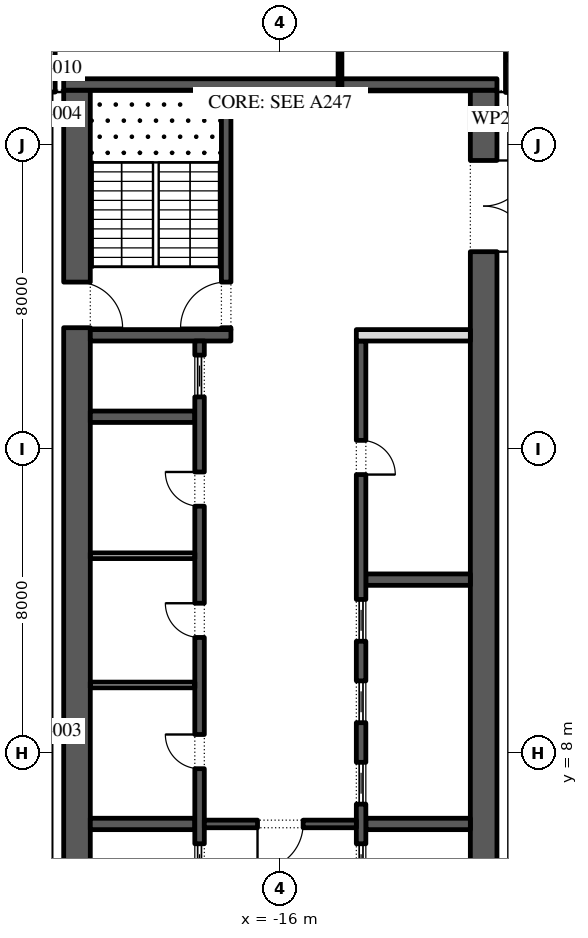
"""IFC4 building model, lengths in metres.
Left out: names, types, materials, properties, quantities, classifications, styles, units other than length and angle.
Written with IfcOpenShell. Run it as: python <this file> out.ifc"""

import sys

from ifc_helpers import new_model, si_unit, direction, frame, frame_2d, origin, place, context, subcontext, project, spatial, rectangle, extrude, element, fill, save


model = new_model("IFC4")
c1 = context("Model", 3, precision=1e-05, world=origin(), true_north=direction((0.0, 1.0)))
c2 = subcontext(c1, "Body", "Model", "MODEL_VIEW")
j1 = project(units=[si_unit("LENGTHUNIT", "METRE"), si_unit("PLANEANGLEUNIT", "RADIAN")], contexts=[c1])
p1 = place(None, origin())
s1 = spatial("IfcSite", under=j1, at=p1, CompositionType="ELEMENT")
p2 = place(p1, origin())
s2 = spatial("IfcBuilding", under=s1, at=p2, CompositionType="ELEMENT")
p3 = place(p2, frame((0.0, 0.0, 201.0)))
s3 = spatial("IfcBuildingStorey", under=s2, at=p3, CompositionType="ELEMENT", Elevation=201.0)
p4 = place(p3, frame((-33.157, 30.092, 0.0), z_axis=(0.0, 0.0, 1.0), x_axis=(0.224950279389, -0.974370243697, 0.0)))
e1 = element("IfcWall", 1, at=p4, inside=s3, PredefinedType="STANDARD", context=c2, shape_type="SweptSolid", body=[
    extrude(rectangle(XDim=49.5, YDim=0.3, at=frame_2d((24.75, 0.0))), origin(), (0.0, 0.0, 1.0), 4.0),
])
p5 = place(p4, frame((2.207, 0.0, 0.0)))
e2 = element("IfcOpeningElement", 2, at=p5, cuts=e1, PredefinedType="OPENING", context=c2, shape_type="SweptSolid", body=[
    extrude(rectangle(XDim=2.4, YDim=3.5, at=frame_2d((1.2, 1.75))), frame((0.0, 0.16, 0.0), z_axis=(0.0, -1.0, 0.0), x_axis=(1.0, 0.0, 0.0)), (0.0, 0.0, 1.0), 0.32),
])
p6 = place(p4, frame((8.121, 0.0, 0.45)))
e3 = element("IfcOpeningElement", 3, at=p6, cuts=e1, PredefinedType="OPENING", context=c2, shape_type="SweptSolid", body=[
    extrude(rectangle(XDim=4.5, YDim=2.825, at=frame_2d((2.25, 1.413))), frame((0.0, 0.16, 0.0), z_axis=(0.0, -1.0, 0.0), x_axis=(1.0, 0.0, 0.0)), (0.0, 0.0, 1.0), 0.32),
])
p7 = place(p4, frame((15.236, 0.0, 0.45)))
e4 = element("IfcOpeningElement", 4, at=p7, cuts=e1, PredefinedType="OPENING", context=c2, shape_type="SweptSolid", body=[
    extrude(rectangle(XDim=4.5, YDim=2.95, at=frame_2d((2.25, 1.475))), frame((0.0, 0.16, 0.0), z_axis=(0.0, -1.0, 0.0), x_axis=(1.0, 0.0, 0.0)), (0.0, 0.0, 1.0), 0.32),
])
p8 = place(p4, frame((22.35, 0.0, 0.45)))
e5 = element("IfcOpeningElement", 5, at=p8, cuts=e1, PredefinedType="OPENING", context=c2, shape_type="SweptSolid", body=[
    extrude(rectangle(XDim=4.5, YDim=3.0, at=frame_2d((2.25, 1.5))), frame((0.0, 0.16, 0.0), z_axis=(0.0, -1.0, 0.0), x_axis=(1.0, 0.0, 0.0)), (0.0, 0.0, 1.0), 0.32),
])
p9 = place(p4, frame((30.514, 0.0, 0.0)))
e6 = element("IfcOpeningElement", 6, at=p9, cuts=e1, PredefinedType="OPENING", context=c2, shape_type="SweptSolid", body=[
    extrude(rectangle(XDim=2.4, YDim=3.5, at=frame_2d((1.2, 1.75))), frame((0.0, 0.16, 0.0), z_axis=(0.0, -1.0, 0.0), x_axis=(1.0, 0.0, 0.0)), (0.0, 0.0, 1.0), 0.32),
])
p10 = place(p4, frame((36.579, 0.0, 0.45)))
e7 = element("IfcOpeningElement", 7, at=p10, cuts=e1, PredefinedType="OPENING", context=c2, shape_type="SweptSolid", body=[
    extrude(rectangle(XDim=4.5, YDim=3.05, at=frame_2d((2.25, 1.525))), frame((0.0, 0.16, 0.0), z_axis=(0.0, -1.0, 0.0), x_axis=(1.0, 0.0, 0.0)), (0.0, 0.0, 1.0), 0.32),
])
p11 = place(p4, frame((43.693, 0.0, 0.45)))
e8 = element("IfcOpeningElement", 8, at=p11, cuts=e1, PredefinedType="OPENING", context=c2, shape_type="SweptSolid", body=[
    extrude(rectangle(XDim=4.5, YDim=3.05, at=frame_2d((2.25, 1.525))), frame((0.0, 0.16, 0.0), z_axis=(0.0, -1.0, 0.0), x_axis=(1.0, 0.0, 0.0)), (0.0, 0.0, 1.0), 0.32),
])
p12 = place(p3, frame((-21.35, -2.45, 0.0), z_axis=(0.0, 0.0, 1.0), x_axis=(0.0, 1.0, 0.0)))
e9 = element("IfcWall", 9, at=p12, inside=s3, PredefinedType="SHEAR", context=c2, shape_type="SweptSolid", body=[
    extrude(rectangle(XDim=27.9, YDim=0.7, at=frame_2d((13.95, 0.0))), origin(), (0.0, 0.0, 1.0), 4.0),
])
p13 = place(p12, frame((5.05, 0.0, 0.0)))
e10 = element("IfcOpeningElement", 10, at=p13, cuts=e9, PredefinedType="OPENING", context=c2, shape_type="SweptSolid", body=[
    extrude(rectangle(XDim=1.2, YDim=2.1, at=frame_2d((0.6, 1.05))), frame((0.0, 0.36, 0.0), z_axis=(0.0, -1.0, 0.0), x_axis=(1.0, 0.0, 0.0)), (0.0, 0.0, 1.0), 0.72),
])
p14 = place(p12, frame((21.65, 0.0, 0.0)))
e11 = element("IfcOpeningElement", 11, at=p14, cuts=e9, PredefinedType="OPENING", context=c2, shape_type="SweptSolid", body=[
    extrude(rectangle(XDim=1.2, YDim=2.1, at=frame_2d((0.6, 1.05))), frame((0.0, 0.36, 0.0), z_axis=(0.0, -1.0, 0.0), x_axis=(1.0, 0.0, 0.0)), (0.0, 0.0, 1.0), 0.72),
])
p15 = place(p3, frame((-10.65, -2.45, 0.0), z_axis=(0.0, 0.0, 1.0), x_axis=(0.0, 1.0, 0.0)))
e12 = element("IfcWall", 12, at=p15, inside=s3, PredefinedType="SHEAR", context=c2, shape_type="SweptSolid", body=[
    extrude(rectangle(XDim=27.9, YDim=0.7, at=frame_2d((13.95, 0.0))), origin(), (0.0, 0.0, 1.0), 4.0),
])
p16 = place(p15, frame((23.65, 0.0, 0.0)))
e13 = element("IfcOpeningElement", 13, at=p16, cuts=e12, PredefinedType="OPENING", context=c2, shape_type="SweptSolid", body=[
    extrude(rectangle(XDim=2.4, YDim=2.1, at=frame_2d((1.2, 1.05))), frame((0.0, 0.36, 0.0), z_axis=(0.0, -1.0, 0.0), x_axis=(1.0, 0.0, 0.0)), (0.0, 0.0, 1.0), 0.72),
])
p17 = place(p15, frame((1.387, 0.0, 0.0)))
e14 = element("IfcOpeningElement", 14, at=p17, cuts=e12, PredefinedType="OPENING", context=c2, shape_type="SweptSolid", body=[
    extrude(rectangle(XDim=0.9, YDim=2.1, at=frame_2d((0.45, 1.05))), frame((0.0, 0.36, 0.0), z_axis=(0.0, -1.0, 0.0), x_axis=(1.0, 0.0, 0.0)), (0.0, 0.0, 1.0), 0.72),
])
p18 = place(p15, frame((4.562, 0.0, 0.0)))
e15 = element("IfcOpeningElement", 15, at=p18, cuts=e12, PredefinedType="OPENING", context=c2, shape_type="SweptSolid", body=[
    extrude(rectangle(XDim=1.0, YDim=2.1, at=frame_2d((0.5, 1.05))), frame((0.0, 0.36, 0.0), z_axis=(0.0, -1.0, 0.0), x_axis=(1.0, 0.0, 0.0)), (0.0, 0.0, 1.0), 0.72),
])
p19 = place(p3, frame((-21.7, 25.6, 0.0), z_axis=(0.0, 0.0, 1.0), x_axis=(1.0, 0.0, 0.0)))
e16 = element("IfcWall", 16, at=p19, inside=s3, PredefinedType="SHEAR", context=c2, shape_type="SweptSolid", body=[
    extrude(rectangle(XDim=11.4, YDim=0.3, at=frame_2d((5.7, 0.0))), origin(), (0.0, 0.0, 1.0), 4.0),
])
p20 = place(p3, frame((-21.0, 19.0, 0.0), z_axis=(0.0, 0.0, 1.0), x_axis=(1.0, 0.0, 0.0)))
e17 = element("IfcWall", 17, at=p20, inside=s3, PredefinedType="SHEAR", context=c2, shape_type="SweptSolid", body=[
    extrude(rectangle(XDim=3.7, YDim=0.3, at=frame_2d((1.85, 0.0))), origin(), (0.0, 0.0, 1.0), 4.0),
])
p21 = place(p3, frame((-17.425, 19.15, 0.0), z_axis=(0.0, 0.0, 1.0), x_axis=(0.0, 1.0, 0.0)))
e18 = element("IfcWall", 18, at=p21, inside=s3, PredefinedType="SHEAR", context=c2, shape_type="SweptSolid", body=[
    extrude(rectangle(XDim=6.3, YDim=0.25, at=frame_2d((3.15, 0.0))), origin(), (0.0, 0.0, 1.0), 4.0),
])
p22 = place(p21, frame((0.05, 0.0, 0.0)))
e19 = element("IfcOpeningElement", 19, at=p22, cuts=e18, PredefinedType="OPENING", context=c2, shape_type="SweptSolid", body=[
    extrude(rectangle(XDim=1.2, YDim=2.1, at=frame_2d((0.6, 1.05))), frame((0.0, 0.135, 0.0), z_axis=(0.0, -1.0, 0.0), x_axis=(1.0, 0.0, 0.0)), (0.0, 0.0, 1.0), 0.27),
])
for number, where, z_axis, x_axis in (
    (20, (-21.0, 6.143, 0.0), (0.0, 0.0, 1.0), (1.0, 0.0, 0.0)),
    (21, (-21.0, 16.857, 0.0), (0.0, 0.0, 1.0), (1.0, 0.0, 0.0)),
):
    element("IfcWall", number, at=place(p3, frame(where, z_axis=z_axis, x_axis=x_axis)), inside=s3, PredefinedType="SHEAR", context=c2, shape_type="SweptSolid", body=[
        extrude(rectangle(XDim=2.75, YDim=0.3, at=frame_2d((1.375, 0.0))), origin(), (0.0, 0.0, 1.0), 4.0),
    ])
p23 = place(p3, frame((-18.125, 4.15, 0.0), z_axis=(0.0, 0.0, 1.0), x_axis=(0.0, 1.0, 0.0)))
e22 = element("IfcWall", 22, at=p23, inside=s3, PredefinedType="SHEAR", context=c2, shape_type="SweptSolid", body=[
    extrude(rectangle(XDim=14.7, YDim=0.25, at=frame_2d((7.35, 0.0))), origin(), (0.0, 0.0, 1.0), 4.0),
])
p24 = place(p23, frame((3.446, 0.0, 0.0)))
e23 = element("IfcOpeningElement", 23, at=p24, cuts=e22, PredefinedType="OPENING", context=c2, shape_type="SweptSolid", body=[
    extrude(rectangle(XDim=0.9, YDim=2.1, at=frame_2d((0.45, 1.05))), frame((0.0, 0.135, 0.0), z_axis=(0.0, -1.0, 0.0), x_axis=(1.0, 0.0, 0.0)), (0.0, 0.0, 1.0), 0.27),
])
p25 = place(p23, frame((6.9, 0.0, 0.0)))
e24 = element("IfcOpeningElement", 24, at=p25, cuts=e22, PredefinedType="OPENING", context=c2, shape_type="SweptSolid", body=[
    extrude(rectangle(XDim=0.9, YDim=2.1, at=frame_2d((0.45, 1.05))), frame((0.0, 0.135, 0.0), z_axis=(0.0, -1.0, 0.0), x_axis=(1.0, 0.0, 0.0)), (0.0, 0.0, 1.0), 0.27),
])
p26 = place(p23, frame((10.354, 0.0, 0.0)))
e25 = element("IfcOpeningElement", 25, at=p26, cuts=e22, PredefinedType="OPENING", context=c2, shape_type="SweptSolid", body=[
    extrude(rectangle(XDim=0.9, YDim=2.1, at=frame_2d((0.45, 1.05))), frame((0.0, 0.135, 0.0), z_axis=(0.0, -1.0, 0.0), x_axis=(1.0, 0.0, 0.0)), (0.0, 0.0, 1.0), 0.27),
])
p27 = place(p23, frame((0.371, 0.0, 0.0)))
e26 = element("IfcOpeningElement", 26, at=p27, cuts=e22, PredefinedType="OPENING", context=c2, shape_type="SweptSolid", body=[
    extrude(rectangle(XDim=1.1, YDim=2.1, at=frame_2d((0.55, 1.05))), frame((0.0, 0.135, 0.0), z_axis=(0.0, -1.0, 0.0), x_axis=(1.0, 0.0, 0.0)), (0.0, 0.0, 1.0), 0.27),
])
p28 = place(p23, frame((13.229, 0.0, 0.0)))
e27 = element("IfcOpeningElement", 27, at=p28, cuts=e22, PredefinedType="OPENING", context=c2, shape_type="SweptSolid", body=[
    extrude(rectangle(XDim=1.1, YDim=2.1, at=frame_2d((0.55, 1.05))), frame((0.0, 0.135, 0.0), z_axis=(0.0, -1.0, 0.0), x_axis=(1.0, 0.0, 0.0)), (0.0, 0.0, 1.0), 0.27),
])
for number, where, z_axis, x_axis in (
    (28, (-21.0, 9.8, 0.0), (0.0, 0.0, 1.0), (1.0, 0.0, 0.0)),
    (29, (-21.0, 13.2, 0.0), (0.0, 0.0, 1.0), (1.0, 0.0, 0.0)),
):
    element("IfcWall", number, at=place(p3, frame(where, z_axis=z_axis, x_axis=x_axis)), inside=s3, PredefinedType="PARTITIONING", context=c2, shape_type="SweptSolid", body=[
        extrude(rectangle(XDim=2.75, YDim=0.15, at=frame_2d((1.375, 0.0))), origin(), (0.0, 0.0, 1.0), 4.0),
    ])
for number, where, z_axis, x_axis in (
    (30, (-13.75, 6.143, 0.0), (0.0, 0.0, 1.0), (1.0, 0.0, 0.0)),
    (31, (-13.75, 12.571, 0.0), (0.0, 0.0, 1.0), (1.0, 0.0, 0.0)),
):
    element("IfcWall", number, at=place(p3, frame(where, z_axis=z_axis, x_axis=x_axis)), inside=s3, PredefinedType="SHEAR", context=c2, shape_type="SweptSolid", body=[
        extrude(rectangle(XDim=2.75, YDim=0.3, at=frame_2d((1.375, 0.0))), origin(), (0.0, 0.0, 1.0), 4.0),
    ])
p29 = place(p3, frame((-13.875, -2.45, 0.0), z_axis=(0.0, 0.0, 1.0), x_axis=(0.0, 1.0, 0.0)))
e32 = element("IfcWall", 32, at=p29, inside=s3, PredefinedType="SHEAR", context=c2, shape_type="SweptSolid", body=[
    extrude(rectangle(XDim=21.3, YDim=0.25, at=frame_2d((10.65, 0.0))), origin(), (0.0, 0.0, 1.0), 4.0),
])
p30 = place(p29, frame((17.786, 0.0, 0.0)))
e33 = element("IfcOpeningElement", 33, at=p30, cuts=e32, PredefinedType="OPENING", context=c2, shape_type="SweptSolid", body=[
    extrude(rectangle(XDim=0.9, YDim=2.1, at=frame_2d((0.45, 1.05))), frame((0.0, 0.135, 0.0), z_axis=(0.0, -1.0, 0.0), x_axis=(1.0, 0.0, 0.0)), (0.0, 0.0, 1.0), 0.27),
])
p31 = place(p29, frame((6.971, 0.0, 0.0)))
e34 = element("IfcOpeningElement", 34, at=p31, cuts=e32, PredefinedType="OPENING", context=c2, shape_type="SweptSolid", body=[
    extrude(rectangle(XDim=1.1, YDim=2.1, at=frame_2d((0.55, 1.05))), frame((0.0, 0.135, 0.0), z_axis=(0.0, -1.0, 0.0), x_axis=(1.0, 0.0, 0.0)), (0.0, 0.0, 1.0), 0.27),
])
p32 = place(p29, frame((9.114, 0.0, 0.0)))
e35 = element("IfcOpeningElement", 35, at=p32, cuts=e32, PredefinedType="OPENING", context=c2, shape_type="SweptSolid", body=[
    extrude(rectangle(XDim=1.1, YDim=2.1, at=frame_2d((0.55, 1.05))), frame((0.0, 0.135, 0.0), z_axis=(0.0, -1.0, 0.0), x_axis=(1.0, 0.0, 0.0)), (0.0, 0.0, 1.0), 0.27),
])
p33 = place(p29, frame((11.257, 0.0, 0.0)))
e36 = element("IfcOpeningElement", 36, at=p33, cuts=e32, PredefinedType="OPENING", context=c2, shape_type="SweptSolid", body=[
    extrude(rectangle(XDim=1.1, YDim=2.1, at=frame_2d((0.55, 1.05))), frame((0.0, 0.135, 0.0), z_axis=(0.0, -1.0, 0.0), x_axis=(1.0, 0.0, 0.0)), (0.0, 0.0, 1.0), 0.27),
])
p34 = place(p29, frame((13.4, 0.0, 0.0)))
e37 = element("IfcOpeningElement", 37, at=p34, cuts=e32, PredefinedType="OPENING", context=c2, shape_type="SweptSolid", body=[
    extrude(rectangle(XDim=1.1, YDim=2.1, at=frame_2d((0.55, 1.05))), frame((0.0, 0.135, 0.0), z_axis=(0.0, -1.0, 0.0), x_axis=(1.0, 0.0, 0.0)), (0.0, 0.0, 1.0), 0.27),
])
p35 = place(p3, frame((-14.0, 19.0, 0.0), z_axis=(0.0, 0.0, 1.0), x_axis=(1.0, 0.0, 0.0)))
e38 = element("IfcWall", 38, at=p35, inside=s3, PredefinedType="PARTITIONING", context=c2, shape_type="SweptSolid", body=[
    extrude(rectangle(XDim=3.0, YDim=0.3, at=frame_2d((1.5, 0.0))), origin(), (0.0, 0.0, 1.0), 4.0),
])
p36 = place(p3, frame((-18.0, 6.143, 0.0), z_axis=(0.0, 0.0, 1.0), x_axis=(1.0, 0.0, 0.0)))
e39 = element("IfcWall", 39, at=p36, inside=s3, PredefinedType="SHEAR", context=c2, shape_type="SweptSolid", body=[
    extrude(rectangle(XDim=4.0, YDim=0.2, at=frame_2d((2.0, 0.0))), origin(), (0.0, 0.0, 1.0), 4.0),
])
p37 = place(p36, frame((1.4, 0.0, 0.0)))
e40 = element("IfcOpeningElement", 40, at=p37, cuts=e39, PredefinedType="OPENING", context=c2, shape_type="SweptSolid", body=[
    extrude(rectangle(XDim=1.2, YDim=2.1, at=frame_2d((0.6, 1.05))), frame((0.0, 0.11, 0.0), z_axis=(0.0, -1.0, 0.0), x_axis=(1.0, 0.0, 0.0)), (0.0, 0.0, 1.0), 0.22),
])
p38 = place(p3, frame((-22.0, 27.125, 0.0), z_axis=(0.0, 0.0, 1.0), x_axis=(0.0, -1.0, 0.0)))
e41 = element("IfcWall", 41, at=p38, inside=s3, PredefinedType="PARTITIONING", context=c2, shape_type="SweptSolid", body=[
    extrude(rectangle(XDim=1.725, YDim=0.15, at=frame_2d((0.863, 0.0))), origin(), (0.0, 0.0, 1.0), 4.0),
])
p39 = place(p3, frame((-14.43, 38.193, 0.0), z_axis=(0.0, 0.0, 1.0), x_axis=(0.0, -1.0, 0.0)))
e42 = element("IfcWall", 42, at=p39, inside=s3, PredefinedType="PARTITIONING", context=c2, shape_type="SweptSolid", body=[
    extrude(rectangle(XDim=12.793, YDim=0.1, at=frame_2d((6.396, 0.0))), origin(), (0.0, 0.0, 1.0), 4.0),
])
p40 = place(p39, frame((4.473, 0.0, 0.0)))
e43 = element("IfcOpeningElement", 43, at=p40, cuts=e42, PredefinedType="OPENING", context=c2, shape_type="SweptSolid", body=[
    extrude(rectangle(XDim=0.9, YDim=2.1, at=frame_2d((0.45, 1.05))), frame((0.0, 0.06, 0.0), z_axis=(0.0, -1.0, 0.0), x_axis=(1.0, 0.0, 0.0)), (0.0, 0.0, 1.0), 0.12),
])
p41 = place(p3, frame((-10.0, 25.39, 0.0), z_axis=(0.0, 0.0, 1.0), x_axis=(0.0, 1.0, 0.0)))
e44 = element("IfcWall", 44, at=p41, inside=s3, PredefinedType="PARTITIONING", context=c2, shape_type="SweptSolid", body=[
    extrude(rectangle(XDim=1.81, YDim=0.15, at=frame_2d((0.905, 0.0))), origin(), (0.0, 0.0, 1.0), 4.0),
])
p42 = place(p24, origin())
e45 = element("IfcDoor", 45, at=p42, inside=s3, OperationType="SINGLE_SWING_LEFT", PredefinedType="DOOR", context=c2, shape_type="SweptSolid", body=[
    extrude(rectangle(XDim=0.9, YDim=2.1, at=frame_2d((0.45, 1.05))), frame((0.0, 0.125, 0.0), z_axis=(0.0, -1.0, 0.0), x_axis=(1.0, 0.0, 0.0)), (0.0, 0.0, 1.0), 0.05),
])
fill(e23, e45)
p43 = place(p25, origin())
e46 = element("IfcDoor", 46, at=p43, inside=s3, OperationType="SINGLE_SWING_LEFT", PredefinedType="DOOR", context=c2, shape_type="SweptSolid", body=[
    extrude(rectangle(XDim=0.9, YDim=2.1, at=frame_2d((0.45, 1.05))), frame((0.0, 0.125, 0.0), z_axis=(0.0, -1.0, 0.0), x_axis=(1.0, 0.0, 0.0)), (0.0, 0.0, 1.0), 0.05),
])
fill(e24, e46)
p44 = place(p26, origin())
e47 = element("IfcDoor", 47, at=p44, inside=s3, OperationType="SINGLE_SWING_LEFT", PredefinedType="DOOR", context=c2, shape_type="SweptSolid", body=[
    extrude(rectangle(XDim=0.9, YDim=2.1, at=frame_2d((0.45, 1.05))), frame((0.0, 0.125, 0.0), z_axis=(0.0, -1.0, 0.0), x_axis=(1.0, 0.0, 0.0)), (0.0, 0.0, 1.0), 0.05),
])
fill(e25, e47)
p45 = place(p27, origin())
e48 = element("IfcDoor", 48, at=p45, inside=s3, OperationType="SLIDING_TO_LEFT", PredefinedType="DOOR", context=c2, shape_type="SweptSolid", body=[
    extrude(rectangle(XDim=1.1, YDim=2.1, at=frame_2d((0.55, 1.05))), frame((0.0, 0.025, 0.0), z_axis=(0.0, -1.0, 0.0), x_axis=(1.0, 0.0, 0.0)), (0.0, 0.0, 1.0), 0.05),
])
fill(e26, e48)
p46 = place(p28, origin())
e49 = element("IfcDoor", 49, at=p46, inside=s3, OperationType="SLIDING_TO_LEFT", PredefinedType="DOOR", context=c2, shape_type="SweptSolid", body=[
    extrude(rectangle(XDim=1.1, YDim=2.1, at=frame_2d((0.55, 1.05))), frame((0.0, 0.025, 0.0), z_axis=(0.0, -1.0, 0.0), x_axis=(1.0, 0.0, 0.0)), (0.0, 0.0, 1.0), 0.05),
])
fill(e27, e49)
p47 = place(p30, frame((0.9, -0.2, 0.0), z_axis=(0.0, 0.0, 1.0), x_axis=(-1.0, 0.0, 0.0)))
e50 = element("IfcDoor", 50, at=p47, inside=s3, OperationType="SINGLE_SWING_LEFT", PredefinedType="DOOR", context=c2, shape_type="SweptSolid", body=[
    extrude(rectangle(XDim=0.9, YDim=2.1, at=frame_2d((0.45, 1.05))), frame((0.0, -0.075, 0.0), z_axis=(0.0, -1.0, 0.0), x_axis=(1.0, 0.0, 0.0)), (0.0, 0.0, 1.0), 0.05),
])
fill(e33, e50)
p48 = place(p31, origin())
e51 = element("IfcDoor", 51, at=p48, inside=s3, OperationType="SLIDING_TO_LEFT", PredefinedType="DOOR", context=c2, shape_type="SweptSolid", body=[
    extrude(rectangle(XDim=1.1, YDim=2.1, at=frame_2d((0.55, 1.05))), frame((0.0, 0.025, 0.0), z_axis=(0.0, -1.0, 0.0), x_axis=(1.0, 0.0, 0.0)), (0.0, 0.0, 1.0), 0.05),
])
fill(e34, e51)
p49 = place(p32, origin())
e52 = element("IfcDoor", 52, at=p49, inside=s3, OperationType="SLIDING_TO_LEFT", PredefinedType="DOOR", context=c2, shape_type="SweptSolid", body=[
    extrude(rectangle(XDim=1.1, YDim=2.1, at=frame_2d((0.55, 1.05))), frame((0.0, 0.025, 0.0), z_axis=(0.0, -1.0, 0.0), x_axis=(1.0, 0.0, 0.0)), (0.0, 0.0, 1.0), 0.05),
])
fill(e35, e52)
p50 = place(p33, origin())
e53 = element("IfcDoor", 53, at=p50, inside=s3, OperationType="SLIDING_TO_LEFT", PredefinedType="DOOR", context=c2, shape_type="SweptSolid", body=[
    extrude(rectangle(XDim=1.1, YDim=2.1, at=frame_2d((0.55, 1.05))), frame((0.0, 0.025, 0.0), z_axis=(0.0, -1.0, 0.0), x_axis=(1.0, 0.0, 0.0)), (0.0, 0.0, 1.0), 0.05),
])
fill(e36, e53)
p51 = place(p34, origin())
e54 = element("IfcDoor", 54, at=p51, inside=s3, OperationType="SLIDING_TO_LEFT", PredefinedType="DOOR", context=c2, shape_type="SweptSolid", body=[
    extrude(rectangle(XDim=1.1, YDim=2.1, at=frame_2d((0.55, 1.05))), frame((0.0, 0.025, 0.0), z_axis=(0.0, -1.0, 0.0), x_axis=(1.0, 0.0, 0.0)), (0.0, 0.0, 1.0), 0.05),
])
fill(e37, e54)
p52 = place(p37, frame((1.2, 0.0, 0.0), z_axis=(0.0, 0.0, 1.0), x_axis=(-1.0, 0.0, 0.0)))
e55 = element("IfcDoor", 55, at=p52, inside=s3, OperationType="SINGLE_SWING_LEFT", PredefinedType="DOOR", context=c2, shape_type="SweptSolid", body=[
    extrude(rectangle(XDim=1.2, YDim=2.1, at=frame_2d((0.6, 1.05))), frame((0.0, 0.025, 0.0), z_axis=(0.0, -1.0, 0.0), x_axis=(1.0, 0.0, 0.0)), (0.0, 0.0, 1.0), 0.05),
])
fill(e40, e55)
p53 = place(p16, frame((2.4, 0.0, 0.0), z_axis=(0.0, 0.0, 1.0), x_axis=(-1.0, 0.0, 0.0)))
e56 = element("IfcDoor", 56, at=p53, inside=s3, OperationType="DOUBLE_DOOR_SINGLE_SWING", PredefinedType="DOOR", context=c2, shape_type="SweptSolid", body=[
    extrude(rectangle(XDim=2.4, YDim=2.1, at=frame_2d((1.2, 1.05))), frame((0.0, 0.025, 0.0), z_axis=(0.0, -1.0, 0.0), x_axis=(1.0, 0.0, 0.0)), (0.0, 0.0, 1.0), 0.05),
])
fill(e13, e56)
p54 = place(p22, origin())
e57 = element("IfcDoor", 57, at=p54, inside=s3, OperationType="SINGLE_SWING_RIGHT", PredefinedType="DOOR", context=c2, shape_type="SweptSolid", body=[
    extrude(rectangle(XDim=1.2, YDim=2.1, at=frame_2d((0.6, 1.05))), frame((0.0, 0.025, 0.0), z_axis=(0.0, -1.0, 0.0), x_axis=(1.0, 0.0, 0.0)), (0.0, 0.0, 1.0), 0.05),
])
fill(e19, e57)
p55 = place(p14, frame((1.2, 0.0, 0.0), z_axis=(0.0, 0.0, 1.0), x_axis=(-1.0, 0.0, 0.0)))
e58 = element("IfcDoor", 58, at=p55, inside=s3, OperationType="SINGLE_SWING_LEFT", PredefinedType="DOOR", context=c2, shape_type="SweptSolid", body=[
    extrude(rectangle(XDim=1.2, YDim=2.1, at=frame_2d((0.6, 1.05))), frame((0.0, 0.025, 0.0), z_axis=(0.0, -1.0, 0.0), x_axis=(1.0, 0.0, 0.0)), (0.0, 0.0, 1.0), 0.05),
])
fill(e11, e58)
save(model, sys.argv[1])
